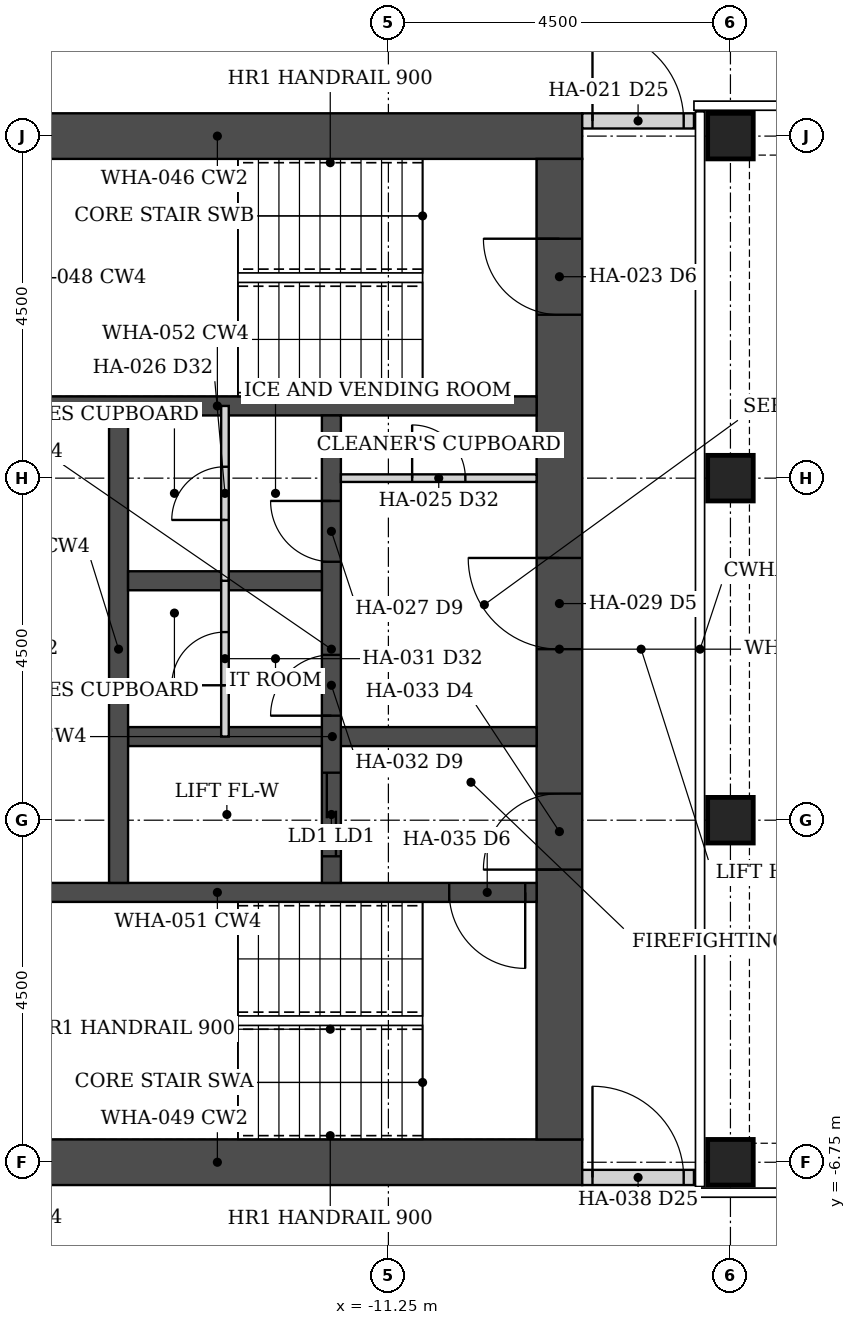
"""IFC4 building model, lengths in metres.
Left out: names, types, materials, properties, quantities, classifications, styles, units other than length and angle.
Written with IfcOpenShell. Run it as: python <this file> out.ifc"""

import sys

from ifc_helpers import new_model, si_unit, direction, frame, frame_2d, origin, origin_2d, place, context, subcontext, project, spatial, rectangle, hollow_rectangle, extrude, element, fill, save


model = new_model("IFC4")
c1 = context("Model", 3, precision=1e-05, world=origin(), true_north=direction((0.0, 1.0)))
c2 = subcontext(c1, "Body", "Model", "MODEL_VIEW")
j1 = project(units=[si_unit("LENGTHUNIT", "METRE"), si_unit("PLANEANGLEUNIT", "RADIAN")], contexts=[c1])
p1 = place(None, origin())
s1 = spatial("IfcSite", under=j1, at=p1, CompositionType="ELEMENT")
p2 = place(p1, origin())
s2 = spatial("IfcBuilding", under=s1, at=p2, CompositionType="ELEMENT")
p3 = place(p2, frame((0.0, 0.0, 118.4)))
s3 = spatial("IfcBuildingStorey", under=s2, at=p3, CompositionType="ELEMENT", Elevation=118.4)
for number, where, z_axis, x_axis in (
    (1, (-6.75, -6.75, 0.0), (0.0, 0.0, 1.0), (1.0, 0.0, 0.0)),
    (2, (-6.75, -2.25, 0.0), (0.0, 0.0, 1.0), (1.0, 0.0, 0.0)),
    (3, (-6.75, 2.25, 0.0), (0.0, 0.0, 1.0), (1.0, 0.0, 0.0)),
    (4, (-6.75, 6.75, 0.0), (0.0, 0.0, 1.0), (1.0, 0.0, 0.0)),
):
    element("IfcColumn", number, at=place(p3, frame(where, z_axis=z_axis, x_axis=x_axis)), inside=s3, PredefinedType="COLUMN", context=c2, shape_type="SweptSolid", body=[
        extrude(hollow_rectangle(XDim=0.6, YDim=0.6, WallThickness=0.04, at=origin_2d()), origin(), (0.0, 0.0, 1.0), 3.6),
    ])
for number, where, z_axis, x_axis in (
    (5, (-8.7, -6.75, 0.0), (0.0, 0.0, 1.0), (-1.0, 0.0, 0.0)),
    (6, (-8.7, 6.75, 0.0), (0.0, 0.0, 1.0), (-1.0, 0.0, 0.0)),
):
    element("IfcWall", number, at=place(p3, frame(where, z_axis=z_axis, x_axis=x_axis)), inside=s3, PredefinedType="SHEAR", context=c2, shape_type="SweptSolid", body=[
        extrude(rectangle(XDim=9.6, YDim=0.6, at=frame_2d((4.8, 0.0))), origin(), (0.0, 0.0, 1.0), 3.6),
    ])
p4 = place(p3, frame((-9.0, -6.45, 0.0), z_axis=(0.0, 0.0, 1.0), x_axis=(0.0, 1.0, 0.0)))
e7 = element("IfcWall", 7, at=p4, inside=s3, PredefinedType="SHEAR", context=c2, shape_type="SweptSolid", body=[
    extrude(rectangle(XDim=12.9, YDim=0.6, at=frame_2d((6.45, 0.0))), origin(), (0.0, 0.0, 1.0), 3.6),
])
p5 = place(p4, frame((3.55, 0.0, 0.0)))
e8 = element("IfcOpeningElement", 8, at=p5, cuts=e7, PredefinedType="OPENING", context=c2, shape_type="SweptSolid", body=[
    extrude(rectangle(XDim=1.0, YDim=2.1, at=frame_2d((0.5, 1.05))), frame((0.0, 0.31, 0.0), z_axis=(0.0, -1.0, 0.0), x_axis=(1.0, 0.0, 0.0)), (0.0, 0.0, 1.0), 0.62),
])
p6 = place(p4, frame((6.45, 0.0, 0.0)))
e9 = element("IfcOpeningElement", 9, at=p6, cuts=e7, PredefinedType="OPENING", context=c2, shape_type="SweptSolid", body=[
    extrude(rectangle(XDim=1.2, YDim=2.1, at=frame_2d((0.6, 1.05))), frame((0.0, 0.31, 0.0), z_axis=(0.0, -1.0, 0.0), x_axis=(1.0, 0.0, 0.0)), (0.0, 0.0, 1.0), 0.62),
])
p7 = place(p4, frame((10.85, 0.0, 0.0)))
e10 = element("IfcOpeningElement", 10, at=p7, cuts=e7, PredefinedType="OPENING", context=c2, shape_type="SweptSolid", body=[
    extrude(rectangle(XDim=1.0, YDim=2.1, at=frame_2d((0.5, 1.05))), frame((0.0, 0.31, 0.0), z_axis=(0.0, -1.0, 0.0), x_axis=(1.0, 0.0, 0.0)), (0.0, 0.0, 1.0), 0.62),
])
p8 = place(p3, frame((-9.3, -3.2, 0.0), z_axis=(0.0, 0.0, 1.0), x_axis=(-1.0, 0.0, 0.0)))
e11 = element("IfcWall", 11, at=p8, inside=s3, PredefinedType="SHEAR", context=c2, shape_type="SweptSolid", body=[
    extrude(rectangle(XDim=8.4, YDim=0.25, at=frame_2d((4.2, 0.0))), origin(), (0.0, 0.0, 1.0), 3.6),
])
p9 = place(p8, frame((0.15, 0.0, 0.0)))
e12 = element("IfcOpeningElement", 12, at=p9, cuts=e11, PredefinedType="OPENING", context=c2, shape_type="SweptSolid", body=[
    extrude(rectangle(XDim=1.0, YDim=2.1, at=frame_2d((0.5, 1.05))), frame((0.0, 0.135, 0.0), z_axis=(0.0, -1.0, 0.0), x_axis=(1.0, 0.0, 0.0)), (0.0, 0.0, 1.0), 0.27),
])
p10 = place(p3, frame((-9.3, 3.2, 0.0), z_axis=(0.0, 0.0, 1.0), x_axis=(-1.0, 0.0, 0.0)))
e13 = element("IfcWall", 13, at=p10, inside=s3, PredefinedType="SHEAR", context=c2, shape_type="SweptSolid", body=[
    extrude(rectangle(XDim=8.4, YDim=0.25, at=frame_2d((4.2, 0.0))), origin(), (0.0, 0.0, 1.0), 3.6),
])
p11 = place(p3, frame((-9.3, -1.15, 0.0), z_axis=(0.0, 0.0, 1.0), x_axis=(-1.0, 0.0, 0.0)))
e14 = element("IfcWall", 14, at=p11, inside=s3, PredefinedType="SHEAR", context=c2, shape_type="SweptSolid", body=[
    extrude(rectangle(XDim=5.375, YDim=0.25, at=frame_2d((2.688, 0.0))), origin(), (0.0, 0.0, 1.0), 3.6),
])
p12 = place(p3, frame((-12.0, -3.075, 0.0), z_axis=(0.0, 0.0, 1.0), x_axis=(0.0, 1.0, 0.0)))
e15 = element("IfcWall", 15, at=p12, inside=s3, PredefinedType="SHEAR", context=c2, shape_type="SweptSolid", body=[
    extrude(rectangle(XDim=6.15, YDim=0.25, at=frame_2d((3.075, 0.0))), origin(), (0.0, 0.0, 1.0), 3.6),
])
p13 = place(p12, frame((2.2, 0.0, 0.0)))
e16 = element("IfcOpeningElement", 16, at=p13, cuts=e15, PredefinedType="OPENING", context=c2, shape_type="SweptSolid", body=[
    extrude(rectangle(XDim=0.8, YDim=2.1, at=frame_2d((0.4, 1.05))), frame((0.0, 0.135, 0.0), z_axis=(0.0, -1.0, 0.0), x_axis=(1.0, 0.0, 0.0)), (0.0, 0.0, 1.0), 0.27),
])
p14 = place(p12, frame((4.225, 0.0, 0.0)))
e17 = element("IfcOpeningElement", 17, at=p14, cuts=e15, PredefinedType="OPENING", context=c2, shape_type="SweptSolid", body=[
    extrude(rectangle(XDim=0.8, YDim=2.1, at=frame_2d((0.4, 1.05))), frame((0.0, 0.135, 0.0), z_axis=(0.0, -1.0, 0.0), x_axis=(1.0, 0.0, 0.0)), (0.0, 0.0, 1.0), 0.27),
])
p15 = place(p12, frame((0.35, 0.0, 0.0)))
e18 = element("IfcOpeningElement", 18, at=p15, cuts=e15, PredefinedType="OPENING", context=c2, shape_type="SweptSolid", body=[
    extrude(rectangle(XDim=1.1, YDim=2.1, at=frame_2d((0.55, 1.05))), frame((0.0, 0.135, 0.0), z_axis=(0.0, -1.0, 0.0), x_axis=(1.0, 0.0, 0.0)), (0.0, 0.0, 1.0), 0.27),
])
p16 = place(p3, frame((-14.8, -3.075, 0.0), z_axis=(0.0, 0.0, 1.0), x_axis=(0.0, 1.0, 0.0)))
e19 = element("IfcWall", 19, at=p16, inside=s3, PredefinedType="SHEAR", context=c2, shape_type="SweptSolid", body=[
    extrude(rectangle(XDim=6.15, YDim=0.25, at=frame_2d((3.075, 0.0))), origin(), (0.0, 0.0, 1.0), 3.6),
])
p17 = place(p3, frame((-12.125, 0.9, 0.0), z_axis=(0.0, 0.0, 1.0), x_axis=(-1.0, 0.0, 0.0)))
e20 = element("IfcWall", 20, at=p17, inside=s3, PredefinedType="SHEAR", context=c2, shape_type="SweptSolid", body=[
    extrude(rectangle(XDim=2.55, YDim=0.25, at=frame_2d((1.275, 0.0))), origin(), (0.0, 0.0, 1.0), 3.6),
])
p18 = place(p3, frame((-8.7, 6.95, 0.0), z_axis=(0.0, 0.0, 1.0), x_axis=(1.0, 0.0, 0.0)))
e21 = element("IfcWall", 21, at=p18, inside=s3, PredefinedType="PARTITIONING", context=c2, shape_type="SweptSolid", body=[
    extrude(rectangle(XDim=1.47, YDim=0.2, at=frame_2d((0.735, 0.0))), origin(), (0.0, 0.0, 1.0), 2.473),
])
p19 = place(p18, frame((0.135, 0.0, 0.0)))
e22 = element("IfcOpeningElement", 22, at=p19, cuts=e21, PredefinedType="OPENING", context=c2, shape_type="SweptSolid", body=[
    extrude(rectangle(XDim=1.2, YDim=2.1, at=frame_2d((0.6, 1.05))), frame((0.0, 0.11, 0.0), z_axis=(0.0, -1.0, 0.0), x_axis=(1.0, 0.0, 0.0)), (0.0, 0.0, 1.0), 0.22),
])
p20 = place(p3, frame((-8.7, -6.95, 0.0), z_axis=(0.0, 0.0, 1.0), x_axis=(1.0, 0.0, 0.0)))
e23 = element("IfcWall", 23, at=p20, inside=s3, PredefinedType="PARTITIONING", context=c2, shape_type="SweptSolid", body=[
    extrude(rectangle(XDim=1.47, YDim=0.2, at=frame_2d((0.735, 0.0))), origin(), (0.0, 0.0, 1.0), 2.473),
])
p21 = place(p20, frame((0.135, 0.0, 0.0)))
e24 = element("IfcOpeningElement", 24, at=p21, cuts=e23, PredefinedType="OPENING", context=c2, shape_type="SweptSolid", body=[
    extrude(rectangle(XDim=1.2, YDim=2.1, at=frame_2d((0.6, 1.05))), frame((0.0, 0.11, 0.0), z_axis=(0.0, -1.0, 0.0), x_axis=(1.0, 0.0, 0.0)), (0.0, 0.0, 1.0), 0.22),
])
p22 = place(p3, frame((-11.875, 2.25, 0.0), z_axis=(0.0, 0.0, 1.0), x_axis=(1.0, 0.0, 0.0)))
e25 = element("IfcWall", 25, at=p22, inside=s3, PredefinedType="PARTITIONING", context=c2, shape_type="SweptSolid", body=[
    extrude(rectangle(XDim=2.575, YDim=0.1, at=frame_2d((1.288, 0.0))), origin(), (0.0, 0.0, 1.0), 2.473),
])
p23 = place(p22, frame((0.938, 0.0, 0.0)))
e26 = element("IfcOpeningElement", 26, at=p23, cuts=e25, PredefinedType="OPENING", context=c2, shape_type="SweptSolid", body=[
    extrude(rectangle(XDim=0.7, YDim=2.1, at=frame_2d((0.35, 1.05))), frame((0.0, 0.06, 0.0), z_axis=(0.0, -1.0, 0.0), x_axis=(1.0, 0.0, 0.0)), (0.0, 0.0, 1.0), 0.12),
])
p24 = place(p3, frame((-13.4, -1.15, 0.0), z_axis=(0.0, 0.0, 1.0), x_axis=(0.0, 1.0, 0.0)))
e27 = element("IfcWall", 27, at=p24, inside=s3, PredefinedType="PARTITIONING", context=c2, shape_type="SweptSolid", body=[
    extrude(rectangle(XDim=2.05, YDim=0.1, at=frame_2d((1.025, 0.0))), origin(), (0.0, 0.0, 1.0), 2.473),
])
p25 = place(p24, frame((0.675, 0.0, 0.0)))
e28 = element("IfcOpeningElement", 28, at=p25, cuts=e27, PredefinedType="OPENING", context=c2, shape_type="SweptSolid", body=[
    extrude(rectangle(XDim=0.7, YDim=2.1, at=frame_2d((0.35, 1.05))), frame((0.0, 0.06, 0.0), z_axis=(0.0, -1.0, 0.0), x_axis=(1.0, 0.0, 0.0)), (0.0, 0.0, 1.0), 0.12),
])
p26 = place(p3, frame((-13.4, 0.9, 0.0), z_axis=(0.0, 0.0, 1.0), x_axis=(0.0, 1.0, 0.0)))
e29 = element("IfcWall", 29, at=p26, inside=s3, PredefinedType="PARTITIONING", context=c2, shape_type="SweptSolid", body=[
    extrude(rectangle(XDim=2.3, YDim=0.1, at=frame_2d((1.15, 0.0))), origin(), (0.0, 0.0, 1.0), 2.473),
])
p27 = place(p26, frame((0.8, 0.0, 0.0)))
e30 = element("IfcOpeningElement", 30, at=p27, cuts=e29, PredefinedType="OPENING", context=c2, shape_type="SweptSolid", body=[
    extrude(rectangle(XDim=0.7, YDim=2.1, at=frame_2d((0.35, 1.05))), frame((0.0, 0.06, 0.0), z_axis=(0.0, -1.0, 0.0), x_axis=(1.0, 0.0, 0.0)), (0.0, 0.0, 1.0), 0.12),
])
p28 = place(p19, origin())
e31 = element("IfcDoor", 31, at=p28, inside=s3, OperationType="DOUBLE_DOOR_DOUBLE_SWING", PredefinedType="DOOR", context=c2, shape_type="SweptSolid", body=[
    extrude(rectangle(XDim=1.2, YDim=2.1, at=frame_2d((0.6, 1.05))), frame((0.0, 0.025, 0.0), z_axis=(0.0, -1.0, 0.0), x_axis=(1.0, 0.0, 0.0)), (0.0, 0.0, 1.0), 0.05),
])
fill(e22, e31)
p29 = place(p21, origin())
e32 = element("IfcDoor", 32, at=p29, inside=s3, OperationType="DOUBLE_DOOR_DOUBLE_SWING", PredefinedType="DOOR", context=c2, shape_type="SweptSolid", body=[
    extrude(rectangle(XDim=1.2, YDim=2.1, at=frame_2d((0.6, 1.05))), frame((0.0, 0.025, 0.0), z_axis=(0.0, -1.0, 0.0), x_axis=(1.0, 0.0, 0.0)), (0.0, 0.0, 1.0), 0.05),
])
fill(e24, e32)
p30 = place(p5, origin())
e33 = element("IfcDoor", 33, at=p30, inside=s3, OperationType="SINGLE_SWING_LEFT", PredefinedType="DOOR", context=c2, shape_type="SweptSolid", body=[
    extrude(rectangle(XDim=1.0, YDim=2.1, at=frame_2d((0.5, 1.05))), frame((0.0, 0.025, 0.0), z_axis=(0.0, -1.0, 0.0), x_axis=(1.0, 0.0, 0.0)), (0.0, 0.0, 1.0), 0.05),
])
fill(e8, e33)
p31 = place(p9, origin())
e34 = element("IfcDoor", 34, at=p31, inside=s3, OperationType="SINGLE_SWING_LEFT", PredefinedType="DOOR", context=c2, shape_type="SweptSolid", body=[
    extrude(rectangle(XDim=1.0, YDim=2.1, at=frame_2d((0.5, 1.05))), frame((0.0, 0.025, 0.0), z_axis=(0.0, -1.0, 0.0), x_axis=(1.0, 0.0, 0.0)), (0.0, 0.0, 1.0), 0.05),
])
fill(e12, e34)
p32 = place(p23, origin())
e35 = element("IfcDoor", 35, at=p32, inside=s3, OperationType="SINGLE_SWING_LEFT", PredefinedType="DOOR", context=c2, shape_type="SweptSolid", body=[
    extrude(rectangle(XDim=0.7, YDim=2.1, at=frame_2d((0.35, 1.05))), frame((0.0, 0.025, 0.0), z_axis=(0.0, -1.0, 0.0), x_axis=(1.0, 0.0, 0.0)), (0.0, 0.0, 1.0), 0.05),
])
fill(e26, e35)
p33 = place(p6, origin())
e36 = element("IfcDoor", 36, at=p33, inside=s3, OperationType="SINGLE_SWING_RIGHT", PredefinedType="DOOR", context=c2, shape_type="SweptSolid", body=[
    extrude(rectangle(XDim=1.2, YDim=2.1, at=frame_2d((0.6, 1.05))), frame((0.0, 0.025, 0.0), z_axis=(0.0, -1.0, 0.0), x_axis=(1.0, 0.0, 0.0)), (0.0, 0.0, 1.0), 0.05),
])
fill(e9, e36)
p34 = place(p25, origin())
e37 = element("IfcDoor", 37, at=p34, inside=s3, OperationType="SINGLE_SWING_LEFT", PredefinedType="DOOR", context=c2, shape_type="SweptSolid", body=[
    extrude(rectangle(XDim=0.7, YDim=2.1, at=frame_2d((0.35, 1.05))), frame((0.0, 0.025, 0.0), z_axis=(0.0, -1.0, 0.0), x_axis=(1.0, 0.0, 0.0)), (0.0, 0.0, 1.0), 0.05),
])
fill(e28, e37)
p35 = place(p13, origin())
e38 = element("IfcDoor", 38, at=p35, inside=s3, OperationType="SINGLE_SWING_LEFT", PredefinedType="DOOR", context=c2, shape_type="SweptSolid", body=[
    extrude(rectangle(XDim=0.8, YDim=2.1, at=frame_2d((0.4, 1.05))), frame((0.0, 0.025, 0.0), z_axis=(0.0, -1.0, 0.0), x_axis=(1.0, 0.0, 0.0)), (0.0, 0.0, 1.0), 0.05),
])
fill(e16, e38)
p36 = place(p27, origin())
e39 = element("IfcDoor", 39, at=p36, inside=s3, OperationType="SINGLE_SWING_LEFT", PredefinedType="DOOR", context=c2, shape_type="SweptSolid", body=[
    extrude(rectangle(XDim=0.7, YDim=2.1, at=frame_2d((0.35, 1.05))), frame((0.0, 0.025, 0.0), z_axis=(0.0, -1.0, 0.0), x_axis=(1.0, 0.0, 0.0)), (0.0, 0.0, 1.0), 0.05),
])
fill(e30, e39)
p37 = place(p14, origin())
e40 = element("IfcDoor", 40, at=p37, inside=s3, OperationType="SINGLE_SWING_RIGHT", PredefinedType="DOOR", context=c2, shape_type="SweptSolid", body=[
    extrude(rectangle(XDim=0.8, YDim=2.1, at=frame_2d((0.4, 1.05))), frame((0.0, 0.025, 0.0), z_axis=(0.0, -1.0, 0.0), x_axis=(1.0, 0.0, 0.0)), (0.0, 0.0, 1.0), 0.05),
])
fill(e17, e40)
p38 = place(p7, origin())
e41 = element("IfcDoor", 41, at=p38, inside=s3, OperationType="SINGLE_SWING_RIGHT", PredefinedType="DOOR", context=c2, shape_type="SweptSolid", body=[
    extrude(rectangle(XDim=1.0, YDim=2.1, at=frame_2d((0.5, 1.05))), frame((0.0, 0.025, 0.0), z_axis=(0.0, -1.0, 0.0), x_axis=(1.0, 0.0, 0.0)), (0.0, 0.0, 1.0), 0.05),
])
fill(e10, e41)
p39 = place(p15, origin())
e42 = element("IfcDoor", 42, at=p39, inside=s3, OperationType="DOUBLE_DOOR_SLIDING", PredefinedType="DOOR", context=c2, shape_type="SweptSolid", body=[
    extrude(rectangle(XDim=1.1, YDim=2.1, at=frame_2d((0.55, 1.05))), frame((0.0, 0.025, 0.0), z_axis=(0.0, -1.0, 0.0), x_axis=(1.0, 0.0, 0.0)), (0.0, 0.0, 1.0), 0.05),
])
fill(e18, e42)
save(model, sys.argv[1])
